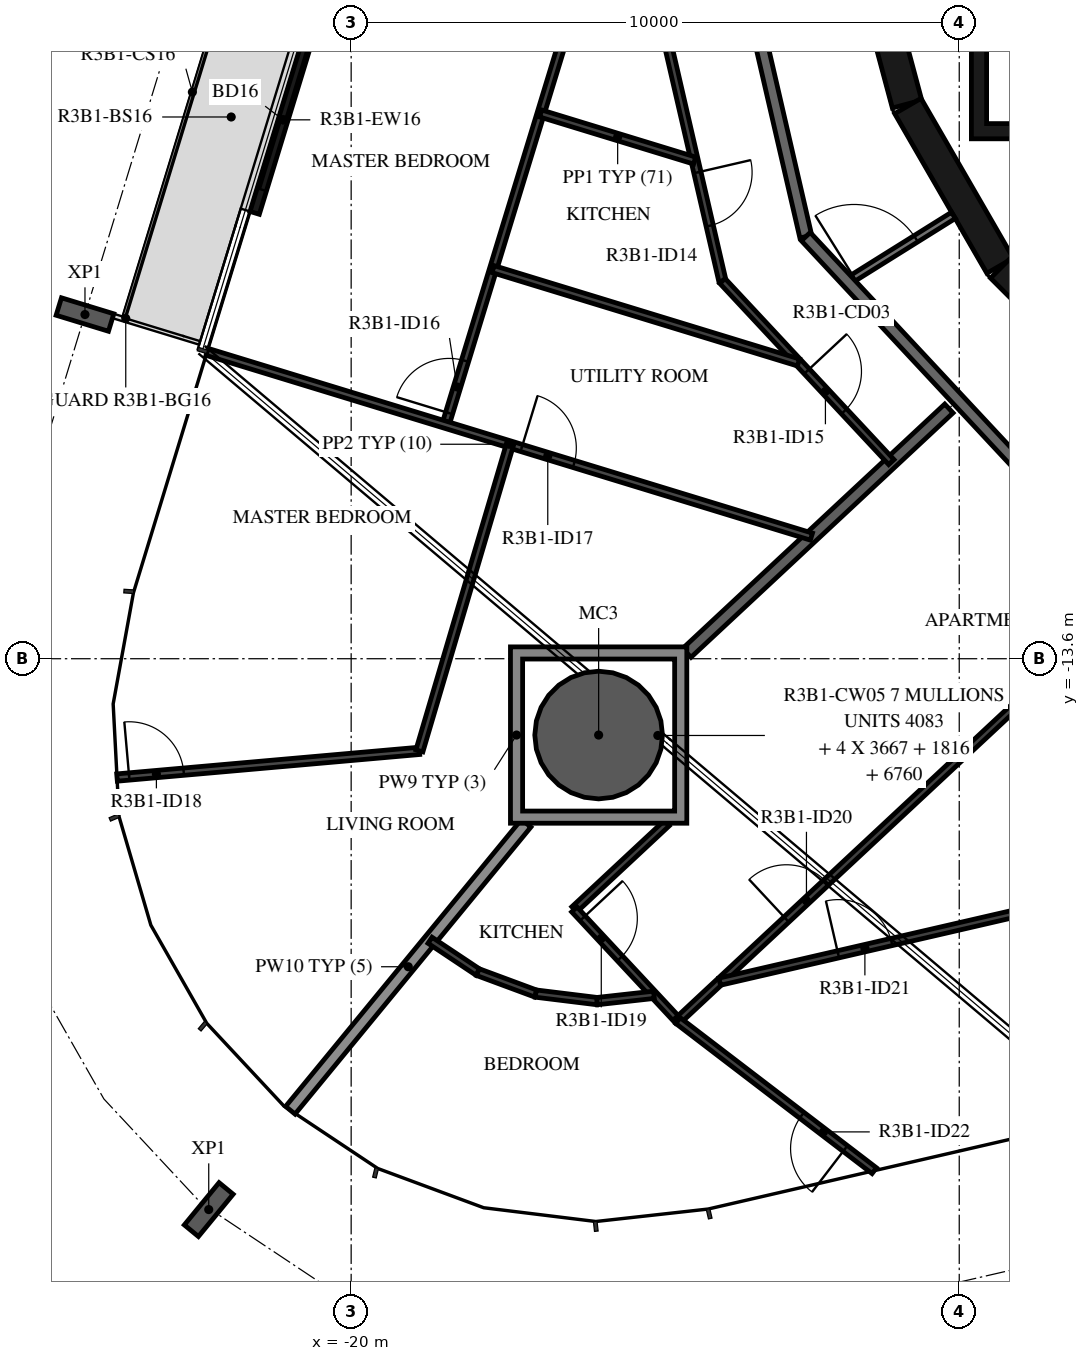
"""IFC4 building model, lengths in metres.
Left out: names, types, materials, properties, quantities, classifications, styles, units other than length and angle.
Written with IfcOpenShell. Run it as: python <this file> out.ifc"""

import sys

from ifc_helpers import new_model, si_unit, direction, frame, frame_2d, origin, origin_2d, place, context, subcontext, project, spatial, polyline, rectangle, hollow_circle, i_section, outline, extrude, element, fill, save


model = new_model("IFC4")
c1 = context("Model", 3, precision=1e-05, world=origin(), true_north=direction((0.0, 1.0)))
c2 = subcontext(c1, "Body", "Model", "MODEL_VIEW")
j1 = project(units=[si_unit("LENGTHUNIT", "METRE"), si_unit("PLANEANGLEUNIT", "RADIAN")], contexts=[c1])
p1 = place(None, origin())
s1 = spatial("IfcSite", under=j1, at=p1, CompositionType="ELEMENT")
p2 = place(p1, origin())
s2 = spatial("IfcBuilding", under=s1, at=p2, CompositionType="ELEMENT")
p3 = place(p2, frame((0.0, 0.0, 123.9)))
s3 = spatial("IfcBuildingStorey", under=s2, at=p3, CompositionType="ELEMENT", Elevation=123.9)
p4 = place(p3, frame((-15.93, -14.855, -0.38), z_axis=(0.0, 0.0, 1.0), x_axis=(1.0, 0.0, 0.0)))
e1 = element("IfcColumn", 1, at=p4, inside=s3, PredefinedType="COLUMN", context=c2, shape_type="SweptSolid", body=[
    extrude(hollow_circle(Radius=1.05, WallThickness=0.05, at=origin_2d()), origin(), (0.0, 0.0, 1.0), 3.5),
])
for number, where, z_axis, x_axis in (
    (2, (-24.377, -7.94, -0.38), (0.0, 0.0, 1.0), (0.292, 0.956, 0.0)),
    (3, (-22.342, -22.659, -0.38), (0.0, 0.0, 1.0), (-0.773, 0.635, 0.0)),
):
    element("IfcColumn", number, at=place(p3, frame(where, z_axis=z_axis, x_axis=x_axis)), inside=s3, PredefinedType="COLUMN", context=c2, shape_type="SweptSolid", body=[
        extrude(i_section(OverallWidth=0.3, OverallDepth=0.9, WebThickness=0.019, FlangeThickness=0.035, FilletRadius=0.03, at=origin_2d()), origin(), (0.0, 0.0, 1.0), 3.5),
    ])
p5 = place(p3, frame((-20.651, -3.208, 0.0), z_axis=(0.0, 0.0, 1.0), x_axis=(-0.292369725807, -0.956305360976, 0.0)))
e4 = element("IfcWall", 4, at=p5, inside=s3, PredefinedType="STANDARD", context=c2, shape_type="SweptSolid", body=[
    extrude(rectangle(XDim=3.2, YDim=0.16, at=frame_2d((1.6, 0.0))), origin(), (0.0, 0.0, 1.0), 3.12),
])
p6 = place(p5, frame((0.4, 0.0, 0.0)))
e5 = element("IfcOpeningElement", 5, at=p6, cuts=e4, PredefinedType="OPENING", context=c2, shape_type="SweptSolid", body=[
    extrude(rectangle(XDim=2.4, YDim=2.4, at=frame_2d((1.2, 1.2))), frame((0.0, 0.09, 0.0), z_axis=(0.0, -1.0, 0.0), x_axis=(1.0, 0.0, 0.0)), (0.0, 0.0, 1.0), 0.18),
])
p7 = place(p3, frame((-11.643, -1.55, 0.0), z_axis=(0.0, 0.0, 1.0), x_axis=(0.258734743916, -0.965948410781, 0.0)))
e6 = element("IfcWall", 6, at=p7, inside=s3, PredefinedType="SHEAR", context=c2, shape_type="SweptSolid", body=[
    extrude(rectangle(XDim=3.033, YDim=0.5, at=frame_2d((1.516, 0.0))), origin(), (0.0, 0.0, 1.0), 3.12),
])
p8 = place(p7, frame((1.066, 0.0, 0.0)))
e7 = element("IfcOpeningElement", 7, at=p8, cuts=e6, PredefinedType="OPENING", context=c2, shape_type="SweptSolid", body=[
    extrude(rectangle(XDim=0.9, YDim=2.1, at=frame_2d((0.45, 1.05))), frame((0.0, 0.26, 0.0), z_axis=(0.0, -1.0, 0.0), x_axis=(1.0, 0.0, 0.0)), (0.0, 0.0, 1.0), 0.52),
])
p9 = place(p3, frame((-10.845, -4.51, 0.0), z_axis=(0.0, 0.0, 1.0), x_axis=(0.500087131594, -0.865975092491, 0.0)))
e8 = element("IfcWall", 8, at=p9, inside=s3, PredefinedType="SHEAR", context=c2, shape_type="SweptSolid", body=[
    extrude(rectangle(XDim=3.033, YDim=0.5, at=frame_2d((1.516, 0.0))), origin(), (0.0, 0.0, 1.0), 3.12),
])
p10 = place(p3, frame((-9.308, -7.164, 0.0), z_axis=(0.0, 0.0, 1.0), x_axis=(0.707106781187, -0.707106781187, 0.0)))
e9 = element("IfcWall", 9, at=p10, inside=s3, PredefinedType="SHEAR", context=c2, shape_type="SweptSolid", body=[
    extrude(rectangle(XDim=3.032, YDim=0.5, at=frame_2d((1.516, 0.0))), origin(), (0.0, 0.0, 1.0), 3.12),
])
p11 = place(p3, origin())
e10 = element("IfcWall", 10, at=p11, inside=s3, PredefinedType="SHEAR", context=c2, shape_type="SweptSolid", body=[
    extrude(outline(polyline([(9.8, -5.05), (9.8, -4.8), (9.8, -1.9), (9.55, -1.9), (9.55, -4.8), (7.65, -4.8), (7.65, -1.9), (7.4, -1.9), (7.4, -4.8), (5.5, -4.8), (5.5, -1.9), (5.25, -1.9), (5.25, -4.8), (3.35, -4.8), (3.35, -1.9), (3.1, -1.9), (3.1, -4.8), (1.2, -4.8), (1.2, -1.9), (0.95, -1.9), (0.95, -4.8), (-0.95, -4.8), (-0.95, -1.9), (-1.2, -1.9), (-1.2, -4.8), (-5.25, -4.8), (-5.25, -1.9), (-5.5, -1.9), (-5.5, -4.8), (-7.4, -4.8), (-7.4, -1.9), (-7.65, -1.9), (-7.65, -4.8), (-9.55, -4.8), (-9.55, -1.9), (-9.8, -1.9), (-9.8, -4.8), (-9.8, -5.05), (9.8, -5.05)])), origin(), (0.0, 0.0, 1.0), 3.12),
])
p12 = place(p3, frame((-11.836, -7.396, 0.0), z_axis=(0.0, 0.0, 1.0), x_axis=(0.848071831599, 0.529881277692, 0.0)))
e11 = element("IfcWall", 11, at=p12, inside=s3, PredefinedType="PARTITIONING", context=c2, shape_type="SweptSolid", body=[
    extrude(rectangle(XDim=2.052, YDim=0.12, at=frame_2d((1.026, 0.0))), origin(), (0.0, 0.0, 1.0), 3.12),
])
p13 = place(p12, frame((0.125, 0.0, 0.0)))
e12 = element("IfcOpeningElement", 12, at=p13, cuts=e11, PredefinedType="OPENING", context=c2, shape_type="SweptSolid", body=[
    extrude(rectangle(XDim=1.2, YDim=2.1, at=frame_2d((0.6, 1.05))), frame((0.0, 0.07, 0.0), z_axis=(0.0, -1.0, 0.0), x_axis=(1.0, 0.0, 0.0)), (0.0, 0.0, 1.0), 0.14),
])
p14 = place(p3, frame((-14.175, 0.495, 0.0), z_axis=(0.0, 0.0, 1.0), x_axis=(0.224922649383, -0.974376622151, 0.0)))
e13 = element("IfcWall", 13, at=p14, inside=s3, PredefinedType="STANDARD", context=c2, shape_type="SweptSolid", body=[
    extrude(rectangle(XDim=7.342, YDim=0.2, at=frame_2d((3.671, 0.0))), origin(), (0.0, 0.0, 1.0), 3.12),
])
p15 = place(p3, frame((-12.523, -6.659, 0.0), z_axis=(0.0, 0.0, 1.0), x_axis=(0.682001841105, -0.731350455479, 0.0)))
e14 = element("IfcWall", 14, at=p15, inside=s3, PredefinedType="STANDARD", context=c2, shape_type="SweptSolid", body=[
    extrude(rectangle(XDim=7.342, YDim=0.2, at=frame_2d((3.671, 0.0))), origin(), (0.0, 0.0, 1.0), 3.12),
])
p16 = place(p3, frame((-14.479, -13.504, 0.0), z_axis=(0.0, 0.0, 1.0), x_axis=(0.731329393611, 0.682024426278, 0.0)))
e15 = element("IfcWall", 15, at=p16, inside=s3, PredefinedType="STANDARD", context=c2, shape_type="SweptSolid", body=[
    extrude(rectangle(XDim=5.892, YDim=0.2, at=frame_2d((2.946, 0.0))), origin(), (0.0, 0.0, 1.0), 3.12),
])
p17 = place(p3, frame((-21.0, -21.025, 0.0), z_axis=(0.0, 0.0, 1.0), x_axis=(0.634846795952, 0.772638043116, 0.0)))
e16 = element("IfcWall", 16, at=p17, inside=s3, PredefinedType="STANDARD", context=c2, shape_type="SweptSolid", body=[
    extrude(rectangle(XDim=6.109, YDim=0.2, at=frame_2d((3.055, 0.0))), origin(), (0.0, 0.0, 1.0), 2.73),
])
p18 = place(p3, frame((-15.727, 0.549, 0.0), z_axis=(0.0, 0.0, 1.0), x_axis=(0.22493611855, -0.974373512864, 0.0)))
e17 = element("IfcWall", 17, at=p18, inside=s3, PredefinedType="PARTITIONING", context=c2, shape_type="SweptSolid", body=[
    extrude(rectangle(XDim=8.146, YDim=0.12, at=frame_2d((4.073, 0.0))), origin(), (0.0, 0.0, 1.0), 3.12),
])
p19 = place(p18, frame((3.223, 0.0, 0.0)))
e18 = element("IfcOpeningElement", 18, at=p19, cuts=e17, PredefinedType="OPENING", context=c2, shape_type="SweptSolid", body=[
    extrude(rectangle(XDim=0.8, YDim=2.1, at=frame_2d((0.4, 1.05))), frame((0.0, 0.07, 0.0), z_axis=(0.0, -1.0, 0.0), x_axis=(1.0, 0.0, 0.0)), (0.0, 0.0, 1.0), 0.14),
])
p20 = place(p18, frame((6.314, 0.0, 0.0)))
e19 = element("IfcOpeningElement", 19, at=p20, cuts=e17, PredefinedType="OPENING", context=c2, shape_type="SweptSolid", body=[
    extrude(rectangle(XDim=0.9, YDim=2.1, at=frame_2d((0.45, 1.05))), frame((0.0, 0.07, 0.0), z_axis=(0.0, -1.0, 0.0), x_axis=(1.0, 0.0, 0.0)), (0.0, 0.0, 1.0), 0.14),
])
p21 = place(p3, frame((-13.894, -7.388, 0.0), z_axis=(0.0, 0.0, 1.0), x_axis=(0.681978591143, -0.731372135935, 0.0)))
e20 = element("IfcWall", 20, at=p21, inside=s3, PredefinedType="PARTITIONING", context=c2, shape_type="SweptSolid", body=[
    extrude(rectangle(XDim=4.073, YDim=0.12, at=frame_2d((2.036, 0.0))), origin(), (0.0, 0.0, 1.0), 3.12),
])
p22 = place(p21, frame((2.033, 0.0, 0.0)))
e21 = element("IfcOpeningElement", 21, at=p22, cuts=e20, PredefinedType="OPENING", context=c2, shape_type="SweptSolid", body=[
    extrude(rectangle(XDim=0.9, YDim=2.1, at=frame_2d((0.45, 1.05))), frame((0.0, 0.07, 0.0), z_axis=(0.0, -1.0, 0.0), x_axis=(1.0, 0.0, 0.0)), (0.0, 0.0, 1.0), 0.14),
])
p23 = place(p3, frame((-18.448, -9.752, 0.0), z_axis=(0.0, 0.0, 1.0), x_axis=(0.292365310779, 0.956306710764, 0.0)))
e22 = element("IfcWall", 22, at=p23, inside=s3, PredefinedType="PARTITIONING", context=c2, shape_type="SweptSolid", body=[
    extrude(rectangle(XDim=8.029, YDim=0.12, at=frame_2d((4.015, 0.0))), origin(), (0.0, 0.0, 1.0), 3.12),
])
p24 = place(p23, frame((0.2, 0.0, 0.0)))
e23 = element("IfcOpeningElement", 23, at=p24, cuts=e22, PredefinedType="OPENING", context=c2, shape_type="SweptSolid", body=[
    extrude(rectangle(XDim=0.9, YDim=2.1, at=frame_2d((0.45, 1.05))), frame((0.0, 0.07, 0.0), z_axis=(0.0, -1.0, 0.0), x_axis=(1.0, 0.0, 0.0)), (0.0, 0.0, 1.0), 0.14),
])
p25 = place(p3, frame((-22.369, -8.554, 0.0), z_axis=(0.0, 0.0, 1.0), x_axis=(0.956298667533, -0.292391618339, 0.0)))
e24 = element("IfcWall", 24, at=p25, inside=s3, PredefinedType="PARTITIONING", context=c2, shape_type="SweptSolid", body=[
    extrude(rectangle(XDim=10.392, YDim=0.12, at=frame_2d((5.196, 0.0))), origin(), (0.0, 0.0, 1.0), 2.73),
])
p26 = place(p25, frame((5.408, 0.0, 0.0)))
e25 = element("IfcOpeningElement", 25, at=p26, cuts=e24, PredefinedType="OPENING", context=c2, shape_type="SweptSolid", body=[
    extrude(rectangle(XDim=0.9, YDim=2.1, at=frame_2d((0.45, 1.05))), frame((0.0, 0.07, 0.0), z_axis=(0.0, -1.0, 0.0), x_axis=(1.0, 0.0, 0.0)), (0.0, 0.0, 1.0), 0.14),
])
p27 = place(p3, frame((-16.883, -4.634, 0.0), z_axis=(0.0, 0.0, 1.0), x_axis=(0.956297869455, -0.292394228526, 0.0)))
e26 = element("IfcWall", 26, at=p27, inside=s3, PredefinedType="PARTITIONING", context=c2, shape_type="SweptSolid", body=[
    extrude(rectangle(XDim=2.648, YDim=0.12, at=frame_2d((1.324, 0.0))), origin(), (0.0, 0.0, 1.0), 3.12),
])
p28 = place(p3, frame((-17.666, -7.193, 0.0), z_axis=(0.0, 0.0, 1.0), x_axis=(0.956299223218, -0.292389800905, 0.0)))
e27 = element("IfcWall", 27, at=p28, inside=s3, PredefinedType="PARTITIONING", context=c2, shape_type="SweptSolid", body=[
    extrude(rectangle(XDim=5.251, YDim=0.12, at=frame_2d((2.625, 0.0))), origin(), (0.0, 0.0, 1.0), 3.12),
])
p29 = place(p3, frame((-23.85, -15.554, 0.0), z_axis=(0.0, 0.0, 1.0), x_axis=(0.996125944733, 0.087938059048, 0.0)))
e28 = element("IfcWall", 28, at=p29, inside=s3, PredefinedType="PARTITIONING", context=c2, shape_type="SweptSolid", body=[
    extrude(rectangle(XDim=4.992, YDim=0.12, at=frame_2d((2.496, 0.0))), origin(), (0.0, 0.0, 1.0), 2.73),
])
p30 = place(p29, frame((0.2, 0.0, 0.0)))
e29 = element("IfcOpeningElement", 29, at=p30, cuts=e28, PredefinedType="OPENING", context=c2, shape_type="SweptSolid", body=[
    extrude(rectangle(XDim=0.9, YDim=2.1, at=frame_2d((0.45, 1.05))), frame((0.0, 0.07, 0.0), z_axis=(0.0, -1.0, 0.0), x_axis=(1.0, 0.0, 0.0)), (0.0, 0.0, 1.0), 0.14),
])
p31 = place(p3, frame((-18.878, -15.115, 0.0), z_axis=(0.0, 0.0, 1.0), x_axis=(0.283491828289, 0.95897465206, 0.0)))
e30 = element("IfcWall", 30, at=p31, inside=s3, PredefinedType="PARTITIONING", context=c2, shape_type="SweptSolid", body=[
    extrude(rectangle(XDim=5.254, YDim=0.12, at=frame_2d((2.627, 0.0))), origin(), (0.0, 0.0, 1.0), 3.12),
])
p32 = place(p3, frame((-14.81, -16.305, 0.0), z_axis=(0.0, 0.0, 1.0), x_axis=(-0.73134426424, -0.682008480272, 0.0)))
e31 = element("IfcWall", 31, at=p32, inside=s3, PredefinedType="PARTITIONING", context=c2, shape_type="SweptSolid", body=[
    extrude(rectangle(XDim=2.078, YDim=0.12, at=frame_2d((1.039, 0.0))), origin(), (0.0, 0.0, 1.0), 3.12),
])
p33 = place(p3, frame((-16.33, -17.723, 0.0), z_axis=(0.0, 0.0, 1.0), x_axis=(0.682018966854, -0.731334484933, 0.0)))
e32 = element("IfcWall", 32, at=p33, inside=s3, PredefinedType="PARTITIONING", context=c2, shape_type="SweptSolid", body=[
    extrude(rectangle(XDim=2.5, YDim=0.12, at=frame_2d((1.25, 0.0))), origin(), (0.0, 0.0, 1.0), 3.12),
])
p34 = place(p33, frame((0.2, 0.0, 0.0)))
e33 = element("IfcOpeningElement", 33, at=p34, cuts=e32, PredefinedType="OPENING", context=c2, shape_type="SweptSolid", body=[
    extrude(rectangle(XDim=0.9, YDim=2.1, at=frame_2d((0.45, 1.05))), frame((0.0, 0.07, 0.0), z_axis=(0.0, -1.0, 0.0), x_axis=(1.0, 0.0, 0.0)), (0.0, 0.0, 1.0), 0.14),
])
p35 = place(p3, frame((-14.625, -19.551, 0.0), z_axis=(0.0, 0.0, 1.0), x_axis=(0.731348282704, 0.682004171091, 0.0)))
e34 = element("IfcWall", 34, at=p35, inside=s3, PredefinedType="PARTITIONING", context=c2, shape_type="SweptSolid", body=[
    extrude(rectangle(XDim=8.975, YDim=0.12, at=frame_2d((4.488, 0.0))), origin(), (0.0, 0.0, 1.0), 3.12),
])
p36 = place(p35, frame((2.438, 0.0, 0.0)))
e35 = element("IfcOpeningElement", 35, at=p36, cuts=e34, PredefinedType="OPENING", context=c2, shape_type="SweptSolid", body=[
    extrude(rectangle(XDim=0.9, YDim=2.1, at=frame_2d((0.45, 1.05))), frame((0.0, 0.07, 0.0), z_axis=(0.0, -1.0, 0.0), x_axis=(1.0, 0.0, 0.0)), (0.0, 0.0, 1.0), 0.14),
])
p37 = place(p3, frame((-18.703, -18.23, 0.0), z_axis=(0.0, 0.0, 1.0), x_axis=(0.832328473933, -0.554282699965, 0.0)))
e36 = element("IfcWall", 36, at=p37, inside=s3, PredefinedType="PARTITIONING", context=c2, shape_type="SweptSolid", body=[
    extrude(rectangle(XDim=0.945, YDim=0.12, at=frame_2d((0.472, 0.0))), origin(), (0.0, 0.0, 1.0), 3.12),
])
p38 = place(p3, frame((-17.917, -18.754, 0.0), z_axis=(0.0, 0.0, 1.0), x_axis=(0.937684971769, -0.347486537462, 0.0)))
e37 = element("IfcWall", 37, at=p38, inside=s3, PredefinedType="PARTITIONING", context=c2, shape_type="SweptSolid", body=[
    extrude(rectangle(XDim=1.016, YDim=0.12, at=frame_2d((0.508, 0.0))), origin(), (0.0, 0.0, 1.0), 3.12),
])
p39 = place(p3, frame((-16.964, -19.107, 0.0), z_axis=(0.0, 0.0, 1.0), x_axis=(0.992523553766, -0.122053247474, 0.0)))
e38 = element("IfcWall", 38, at=p39, inside=s3, PredefinedType="PARTITIONING", context=c2, shape_type="SweptSolid", body=[
    extrude(rectangle(XDim=1.016, YDim=0.12, at=frame_2d((0.508, 0.0))), origin(), (0.0, 0.0, 1.0), 3.12),
])
p40 = place(p3, frame((-15.956, -19.231, 0.0), z_axis=(0.0, 0.0, 1.0), x_axis=(0.993867897435, 0.110573968218, 0.0)))
e39 = element("IfcWall", 39, at=p40, inside=s3, PredefinedType="PARTITIONING", context=c2, shape_type="SweptSolid", body=[
    extrude(rectangle(XDim=0.941, YDim=0.12, at=frame_2d((0.47, 0.0))), origin(), (0.0, 0.0, 1.0), 3.12),
])
p41 = place(p3, frame((-11.397, -22.019, 0.0), z_axis=(0.0, 0.0, 1.0), x_axis=(-0.794391941464, 0.60740550157, 0.0)))
e40 = element("IfcWall", 40, at=p41, inside=s3, PredefinedType="PARTITIONING", context=c2, shape_type="SweptSolid", body=[
    extrude(rectangle(XDim=4.063, YDim=0.12, at=frame_2d((2.032, 0.0))), origin(), (0.0, 0.0, 1.0), 3.12),
])
p42 = place(p41, frame((0.6, 0.0, 0.0)))
e41 = element("IfcOpeningElement", 41, at=p42, cuts=e40, PredefinedType="OPENING", context=c2, shape_type="SweptSolid", body=[
    extrude(rectangle(XDim=0.9, YDim=2.1, at=frame_2d((0.45, 1.05))), frame((0.0, 0.07, 0.0), z_axis=(0.0, -1.0, 0.0), x_axis=(1.0, 0.0, 0.0)), (0.0, 0.0, 1.0), 0.14),
])
p43 = place(p3, frame((-13.939, -18.911, 0.0), z_axis=(0.0, 0.0, 1.0), x_axis=(0.974369607456, 0.224953035245, 0.0)))
e42 = element("IfcWall", 42, at=p43, inside=s3, PredefinedType="PARTITIONING", context=c2, shape_type="SweptSolid", body=[
    extrude(rectangle(XDim=33.934, YDim=0.12, at=frame_2d((16.967, 0.0))), origin(), (0.0, 0.0, 1.0), 3.12),
])
p44 = place(p43, frame((2.0, 0.0, 0.0)))
e43 = element("IfcOpeningElement", 43, at=p44, cuts=e42, PredefinedType="OPENING", context=c2, shape_type="SweptSolid", body=[
    extrude(rectangle(XDim=0.9, YDim=2.1, at=frame_2d((0.45, 1.05))), frame((0.0, 0.07, 0.0), z_axis=(0.0, -1.0, 0.0), x_axis=(1.0, 0.0, 0.0)), (0.0, 0.0, 1.0), 0.14),
])
p45 = place(p43, frame((28.154, 0.0, 0.0)))
e44 = element("IfcOpeningElement", 44, at=p45, cuts=e42, PredefinedType="OPENING", context=c2, shape_type="SweptSolid", body=[
    extrude(rectangle(XDim=0.9, YDim=2.1, at=frame_2d((0.45, 1.05))), frame((0.0, 0.07, 0.0), z_axis=(0.0, -1.0, 0.0), x_axis=(1.0, 0.0, 0.0)), (0.0, 0.0, 1.0), 0.14),
])
p46 = place(p43, frame((30.039, 0.0, 0.0)))
e45 = element("IfcOpeningElement", 45, at=p46, cuts=e42, PredefinedType="OPENING", context=c2, shape_type="SweptSolid", body=[
    extrude(rectangle(XDim=0.9, YDim=2.1, at=frame_2d((0.45, 1.05))), frame((0.0, 0.07, 0.0), z_axis=(0.0, -1.0, 0.0), x_axis=(1.0, 0.0, 0.0)), (0.0, 0.0, 1.0), 0.14),
])
p47 = place(p3, origin())
e46 = element("IfcWall", 46, at=p47, inside=s3, PredefinedType="STANDARD", context=c2, shape_type="SweptSolid", body=[
    extrude(outline(polyline([(-14.48, -13.405), (-14.48, -16.305), (-17.38, -16.305), (-17.38, -13.405), (-14.48, -13.405)]), holes=[polyline([(-17.18, -16.105), (-14.68, -16.105), (-14.68, -13.605), (-17.18, -13.605), (-17.18, -16.105)])]), origin(), (0.0, 0.0, 1.0), 3.12),
])
p48 = place(p6, origin())
e47 = element("IfcDoor", 47, at=p48, inside=s3, OperationType="DOUBLE_DOOR_SLIDING", PredefinedType="DOOR", context=c2, shape_type="SweptSolid", body=[
    extrude(rectangle(XDim=2.4, YDim=2.4, at=frame_2d((1.2, 1.2))), frame((0.0, 0.025, 0.0), z_axis=(0.0, -1.0, 0.0), x_axis=(1.0, 0.0, 0.0)), (0.0, 0.0, 1.0), 0.05),
])
fill(e5, e47)
p49 = place(p20, origin())
e48 = element("IfcDoor", 48, at=p49, inside=s3, OperationType="SINGLE_SWING_RIGHT", PredefinedType="DOOR", context=c2, shape_type="SweptSolid", body=[
    extrude(rectangle(XDim=0.9, YDim=2.1, at=frame_2d((0.45, 1.05))), frame((0.0, 0.025, 0.0), z_axis=(0.0, -1.0, 0.0), x_axis=(1.0, 0.0, 0.0)), (0.0, 0.0, 1.0), 0.05),
])
fill(e19, e48)
p50 = place(p22, origin())
e49 = element("IfcDoor", 49, at=p50, inside=s3, OperationType="SINGLE_SWING_RIGHT", PredefinedType="DOOR", context=c2, shape_type="SweptSolid", body=[
    extrude(rectangle(XDim=0.9, YDim=2.1, at=frame_2d((0.45, 1.05))), frame((0.0, 0.025, 0.0), z_axis=(0.0, -1.0, 0.0), x_axis=(1.0, 0.0, 0.0)), (0.0, 0.0, 1.0), 0.05),
])
fill(e21, e49)
p51 = place(p24, origin())
e50 = element("IfcDoor", 50, at=p51, inside=s3, OperationType="SINGLE_SWING_RIGHT", PredefinedType="DOOR", context=c2, shape_type="SweptSolid", body=[
    extrude(rectangle(XDim=0.9, YDim=2.1, at=frame_2d((0.45, 1.05))), frame((0.0, 0.025, 0.0), z_axis=(0.0, -1.0, 0.0), x_axis=(1.0, 0.0, 0.0)), (0.0, 0.0, 1.0), 0.05),
])
fill(e23, e50)
p52 = place(p26, origin())
e51 = element("IfcDoor", 51, at=p52, inside=s3, OperationType="SINGLE_SWING_RIGHT", PredefinedType="DOOR", context=c2, shape_type="SweptSolid", body=[
    extrude(rectangle(XDim=0.9, YDim=2.1, at=frame_2d((0.45, 1.05))), frame((0.0, 0.025, 0.0), z_axis=(0.0, -1.0, 0.0), x_axis=(1.0, 0.0, 0.0)), (0.0, 0.0, 1.0), 0.05),
])
fill(e25, e51)
p53 = place(p30, origin())
e52 = element("IfcDoor", 52, at=p53, inside=s3, OperationType="SINGLE_SWING_LEFT", PredefinedType="DOOR", context=c2, shape_type="SweptSolid", body=[
    extrude(rectangle(XDim=0.9, YDim=2.1, at=frame_2d((0.45, 1.05))), frame((0.0, 0.025, 0.0), z_axis=(0.0, -1.0, 0.0), x_axis=(1.0, 0.0, 0.0)), (0.0, 0.0, 1.0), 0.05),
])
fill(e29, e52)
p54 = place(p34, origin())
e53 = element("IfcDoor", 53, at=p54, inside=s3, OperationType="SINGLE_SWING_LEFT", PredefinedType="DOOR", context=c2, shape_type="SweptSolid", body=[
    extrude(rectangle(XDim=0.9, YDim=2.1, at=frame_2d((0.45, 1.05))), frame((0.0, 0.025, 0.0), z_axis=(0.0, -1.0, 0.0), x_axis=(1.0, 0.0, 0.0)), (0.0, 0.0, 1.0), 0.05),
])
fill(e33, e53)
p55 = place(p36, origin())
e54 = element("IfcDoor", 54, at=p55, inside=s3, OperationType="SINGLE_SWING_LEFT", PredefinedType="DOOR", context=c2, shape_type="SweptSolid", body=[
    extrude(rectangle(XDim=0.9, YDim=2.1, at=frame_2d((0.45, 1.05))), frame((0.0, 0.025, 0.0), z_axis=(0.0, -1.0, 0.0), x_axis=(1.0, 0.0, 0.0)), (0.0, 0.0, 1.0), 0.05),
])
fill(e35, e54)
p56 = place(p44, origin())
e55 = element("IfcDoor", 55, at=p56, inside=s3, OperationType="SINGLE_SWING_LEFT", PredefinedType="DOOR", context=c2, shape_type="SweptSolid", body=[
    extrude(rectangle(XDim=0.9, YDim=2.1, at=frame_2d((0.45, 1.05))), frame((0.0, 0.025, 0.0), z_axis=(0.0, -1.0, 0.0), x_axis=(1.0, 0.0, 0.0)), (0.0, 0.0, 1.0), 0.05),
])
fill(e43, e55)
p57 = place(p42, origin())
e56 = element("IfcDoor", 56, at=p57, inside=s3, OperationType="SINGLE_SWING_LEFT", PredefinedType="DOOR", context=c2, shape_type="SweptSolid", body=[
    extrude(rectangle(XDim=0.9, YDim=2.1, at=frame_2d((0.45, 1.05))), frame((0.0, 0.025, 0.0), z_axis=(0.0, -1.0, 0.0), x_axis=(1.0, 0.0, 0.0)), (0.0, 0.0, 1.0), 0.05),
])
fill(e41, e56)
p58 = place(p13, origin())
e57 = element("IfcDoor", 57, at=p58, inside=s3, OperationType="DOUBLE_DOOR_SINGLE_SWING", PredefinedType="DOOR", context=c2, shape_type="SweptSolid", body=[
    extrude(rectangle(XDim=1.2, YDim=2.1, at=frame_2d((0.6, 1.05))), frame((0.0, 0.025, 0.0), z_axis=(0.0, -1.0, 0.0), x_axis=(1.0, 0.0, 0.0)), (0.0, 0.0, 1.0), 0.05),
])
fill(e12, e57)
save(model, sys.argv[1])
